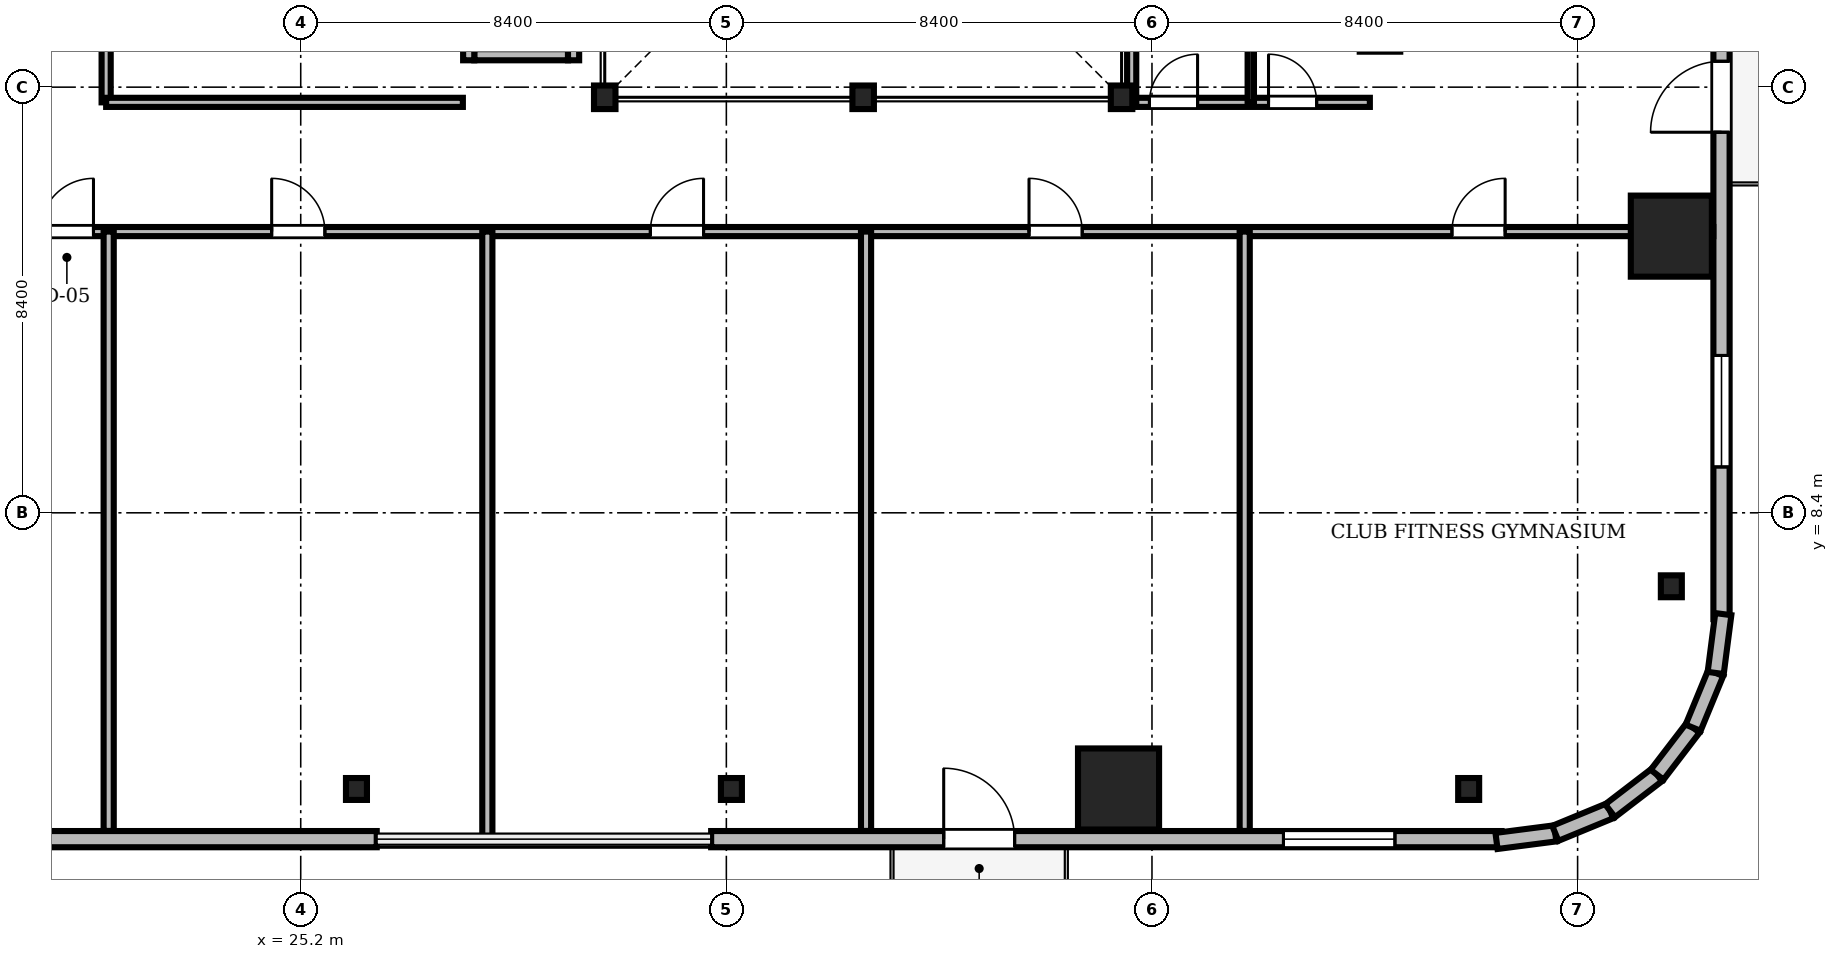
"""IFC4 building model, lengths in metres.
Left out: names, types, materials, properties, quantities, classifications, styles, units other than length and angle.
Written with IfcOpenShell. Run it as: python <this file> out.ifc"""

import sys

from ifc_helpers import new_model, si_unit, direction, frame, frame_2d, origin, origin_2d, place, context, subcontext, project, spatial, rectangle, i_section, extrude, source, transform, mapped, element, fill, save


model = new_model("IFC4")
c1 = context("Model", 3, precision=1e-05, world=origin(), true_north=direction((0.0, 1.0)))
c2 = subcontext(c1, "Body", "Model", "MODEL_VIEW")
j1 = project(units=[si_unit("LENGTHUNIT", "METRE"), si_unit("PLANEANGLEUNIT", "RADIAN")], contexts=[c1])
p1 = place(None, origin())
s1 = spatial("IfcSite", under=j1, at=p1, CompositionType="ELEMENT")
p2 = place(p1, origin())
s2 = spatial("IfcBuilding", under=s1, at=p2, CompositionType="ELEMENT")
p3 = place(p2, frame((0.0, 0.0, 115.0)))
s3 = spatial("IfcBuildingStorey", under=s2, at=p3, CompositionType="ELEMENT", Elevation=115.0)
m1 = source(origin(), c2, "Body", "SweptSolid", [
    extrude(i_section(OverallWidth=0.424, OverallDepth=0.465, WebThickness=0.035, FlangeThickness=0.056, FilletRadius=0.015, at=origin_2d()), origin(), (0.0, 0.0, 1.0), 3.46),
])
for number, where, z_axis, x_axis in (
    (1, (31.2, 16.6, 0.0), (0.0, 0.0, 1.0), (1.0, 0.0, 0.0)),
    (2, (36.3, 16.6, 0.0), (0.0, 0.0, 1.0), (1.0, 0.0, 0.0)),
    (3, (41.4, 16.6, 0.0), (0.0, 0.0, 1.0), (1.0, 0.0, 0.0)),
):
    element("IfcColumn", number, at=place(p3, frame(where, z_axis=z_axis, x_axis=x_axis)), inside=s3, PredefinedType="COLUMN", context=c2, shape_type="MappedRepresentation", body=[
        mapped(m1, transform((0.0, 0.0, 0.0), scale=1.0)),
    ])
m2 = source(origin(), c2, "Body", "SweptSolid", [
    extrude(rectangle(XDim=1.6, YDim=1.6, at=origin_2d()), origin(), (0.0, 0.0, 1.0), 3.46),
])
for number, where, z_axis, x_axis in (
    (4, (41.34, 2.95, 0.0), (0.0, 0.0, 1.0), (1.0, 0.0, 0.0)),
    (5, (52.25, 13.86, 0.0), (0.0, 0.0, 1.0), (1.0, 0.0, 0.0)),
):
    element("IfcColumn", number, at=place(p3, frame(where, z_axis=z_axis, x_axis=x_axis)), inside=s3, PredefinedType="COLUMN", context=c2, shape_type="MappedRepresentation", body=[
        mapped(m2, transform((0.0, 0.0, 0.0), scale=1.0)),
    ])
m3 = source(origin(), c2, "Body", "SweptSolid", [
    extrude(i_section(OverallWidth=0.414, OverallDepth=0.432, WebThickness=0.026, FlangeThickness=0.04, FilletRadius=0.015, at=origin_2d()), origin(), (0.0, 0.0, 1.0), 3.46),
])
for number, where, z_axis, x_axis in (
    (6, (26.3, 2.95, 0.0), (0.0, 0.0, 1.0), (1.0, 0.0, 0.0)),
    (7, (33.7, 2.95, 0.0), (0.0, 0.0, 1.0), (1.0, 0.0, 0.0)),
    (8, (48.25, 2.95, 0.0), (0.0, 0.0, 1.0), (1.0, 0.0, 0.0)),
    (9, (52.25, 6.95, 0.0), (0.0, 0.0, 1.0), (1.0, 0.0, 0.0)),
):
    element("IfcColumn", number, at=place(p3, frame(where, z_axis=z_axis, x_axis=x_axis)), inside=s3, PredefinedType="COLUMN", context=c2, shape_type="MappedRepresentation", body=[
        mapped(m3, transform((0.0, 0.0, 0.0), scale=1.0)),
    ])
m4 = source(origin(), c2, "Body", "SweptSolid", [
    extrude(rectangle(XDim=15.6, YDim=0.32, at=frame_2d((7.8, 0.0))), origin(), (0.0, 0.0, 1.0), 3.46),
])
p4 = place(p3, frame((11.1, 1.96, 0.0), z_axis=(0.0, 0.0, 1.0), x_axis=(1.0, 0.0, 0.0)))
e10 = element("IfcWall", 10, at=p4, inside=s3, PredefinedType="SOLIDWALL", context=c2, shape_type="MappedRepresentation", body=[
    mapped(m4, transform((0.0, 0.0, 0.0), scale=1.0)),
])
m5 = source(origin(), c2, "Body", "SweptSolid", [
    extrude(rectangle(XDim=2.2, YDim=2.4, at=frame_2d((1.1, 1.2))), frame((0.0, 0.17, 0.0), z_axis=(0.0, -1.0, 0.0), x_axis=(1.0, 0.0, 0.0)), (0.0, 0.0, 1.0), 0.34),
])
p5 = place(p4, frame((3.005, 0.0, 0.72)))
e11 = element("IfcOpeningElement", 11, at=p5, cuts=e10, PredefinedType="OPENING", context=c2, shape_type="MappedRepresentation", body=[
    mapped(m5, transform((0.0, 0.0, 0.0), scale=1.0)),
])
p6 = place(p3, frame((33.3, 1.96, 0.0), z_axis=(0.0, 0.0, 1.0), x_axis=(1.0, 0.0, 0.0)))
e12 = element("IfcWall", 12, at=p6, inside=s3, PredefinedType="SOLIDWALL", context=c2, shape_type="MappedRepresentation", body=[
    mapped(m4, transform((0.0, 0.0, 0.0), scale=1.0)),
])
m6 = source(origin(), c2, "Body", "SweptSolid", [
    extrude(rectangle(XDim=1.4, YDim=2.3, at=frame_2d((0.7, 1.15))), frame((0.0, 0.17, 0.0), z_axis=(0.0, -1.0, 0.0), x_axis=(1.0, 0.0, 0.0)), (0.0, 0.0, 1.0), 0.34),
])
p7 = place(p6, frame((4.59, 0.0, 0.0)))
e13 = element("IfcOpeningElement", 13, at=p7, cuts=e12, PredefinedType="OPENING", context=c2, shape_type="MappedRepresentation", body=[
    mapped(m6, transform((0.0, 0.0, 0.0), scale=1.0)),
])
p8 = place(p6, frame((11.295, 0.0, 0.72)))
e14 = element("IfcOpeningElement", 14, at=p8, cuts=e12, PredefinedType="OPENING", context=c2, shape_type="MappedRepresentation", body=[
    mapped(m5, transform((0.0, 0.0, 0.0), scale=1.0)),
])
p9 = place(p3, frame((53.24, 6.3, 0.0), z_axis=(0.0, 0.0, 1.0), x_axis=(0.0, 1.0, 0.0)))
e15 = element("IfcWall", 15, at=p9, inside=s3, PredefinedType="SOLIDWALL", context=c2, shape_type="MappedRepresentation", body=[
    mapped(m4, transform((0.0, 0.0, 0.0), scale=1.0)),
])
p10 = place(p9, frame((9.61, 0.0, 0.0)))
e16 = element("IfcOpeningElement", 16, at=p10, cuts=e15, PredefinedType="OPENING", context=c2, shape_type="MappedRepresentation", body=[
    mapped(m6, transform((0.0, 0.0, 0.0), scale=1.0)),
])
p11 = place(p9, frame((3.005, 0.0, 0.72)))
e17 = element("IfcOpeningElement", 17, at=p11, cuts=e15, PredefinedType="OPENING", context=c2, shape_type="MappedRepresentation", body=[
    mapped(m5, transform((0.0, 0.0, 0.0), scale=1.0)),
])
m7 = source(origin(), c2, "Body", "SweptSolid", [
    extrude(rectangle(XDim=1.17, YDim=0.32, at=frame_2d((0.585, 0.0))), origin(), (0.0, 0.0, 1.0), 3.46),
])
p12 = place(p3, frame((48.8, 1.925, 0.0), z_axis=(0.0, 0.0, 1.0), x_axis=(0.991762485493, 0.128090485085, 0.0)))
e18 = element("IfcWall", 18, at=p12, inside=s3, PredefinedType="SOLIDWALL", context=c2, shape_type="MappedRepresentation", body=[
    mapped(m7, transform((0.0, 0.0, 0.0), scale=1.0)),
])
m8 = source(origin(), c2, "Body", "SweptSolid", [
    extrude(rectangle(XDim=1.169, YDim=0.32, at=frame_2d((0.585, 0.0))), origin(), (0.0, 0.0, 1.0), 3.46),
])
p13 = place(p3, frame((49.96, 2.074, 0.0), z_axis=(0.0, 0.0, 1.0), x_axis=(0.924479075121, 0.381232789334, 0.0)))
e19 = element("IfcWall", 19, at=p13, inside=s3, PredefinedType="SOLIDWALL", context=c2, shape_type="MappedRepresentation", body=[
    mapped(m8, transform((0.0, 0.0, 0.0), scale=1.0)),
])
m9 = source(origin(), c2, "Body", "SweptSolid", [
    extrude(rectangle(XDim=1.169, YDim=0.32, at=frame_2d((0.584, 0.0))), origin(), (0.0, 0.0, 1.0), 3.46),
])
p14 = place(p3, frame((51.041, 2.52, 0.0), z_axis=(0.0, 0.0, 1.0), x_axis=(0.793663520347, 0.608356981114, 0.0)))
e20 = element("IfcWall", 20, at=p14, inside=s3, PredefinedType="SOLIDWALL", context=c2, shape_type="MappedRepresentation", body=[
    mapped(m9, transform((0.0, 0.0, 0.0), scale=1.0)),
])
m10 = source(origin(), c2, "Body", "SweptSolid", [
    extrude(rectangle(XDim=1.169, YDim=0.32, at=frame_2d((0.584, 0.0))), origin(), (0.0, 0.0, 1.0), 3.46),
])
for number, where, z_axis, x_axis in (
    (21, (51.969, 3.231, 0.0), (0.0, 0.0, 1.0), (0.608, 0.794, 0.0)),
    (22, (52.68, 4.159, 0.0), (0.0, 0.0, 1.0), (0.381, 0.925, 0.0)),
):
    element("IfcWall", number, at=place(p3, frame(where, z_axis=z_axis, x_axis=x_axis)), inside=s3, PredefinedType="SOLIDWALL", context=c2, shape_type="MappedRepresentation", body=[
        mapped(m10, transform((0.0, 0.0, 0.0), scale=1.0)),
    ])
m11 = source(origin(), c2, "Body", "SweptSolid", [
    extrude(rectangle(XDim=1.171, YDim=0.32, at=frame_2d((0.585, 0.0))), origin(), (0.0, 0.0, 1.0), 3.46),
])
p15 = place(p3, frame((53.125, 5.24, 0.0), z_axis=(0.0, 0.0, 1.0), x_axis=(0.128269133229, 0.991739395941, 0.0)))
e23 = element("IfcWall", 23, at=p15, inside=s3, PredefinedType="SOLIDWALL", context=c2, shape_type="MappedRepresentation", body=[
    mapped(m11, transform((0.0, 0.0, 0.0), scale=1.0)),
])
m12 = source(origin(), c2, "Body", "SweptSolid", [
    extrude(rectangle(XDim=1.85, YDim=0.22, at=frame_2d((0.925, 0.0))), origin(), (0.0, 0.0, 1.0), 3.46),
])
p16 = place(p3, frame((28.625, 17.44, 0.0), z_axis=(0.0, 0.0, 1.0), x_axis=(1.0, 0.0, 0.0)))
e24 = element("IfcWall", 24, at=p16, inside=s3, PredefinedType="SOLIDWALL", context=c2, shape_type="MappedRepresentation", body=[
    mapped(m12, transform((0.0, 0.0, 0.0), scale=1.0)),
])
m13 = source(origin(), c2, "Body", "SweptSolid", [
    extrude(rectangle(XDim=2.54, YDim=0.22, at=frame_2d((1.27, 0.0))), origin(), (0.0, 0.0, 1.0), 3.46),
])
for number, where, z_axis, x_axis in (
    (25, (28.515, 17.33, 0.0), (0.0, 0.0, 1.0), (0.0, 1.0, 0.0)),
    (26, (30.585, 17.33, 0.0), (0.0, 0.0, 1.0), (0.0, 1.0, 0.0)),
):
    element("IfcWall", number, at=place(p3, frame(where, z_axis=z_axis, x_axis=x_axis)), inside=s3, PredefinedType="SOLIDWALL", context=c2, shape_type="MappedRepresentation", body=[
        mapped(m13, transform((0.0, 0.0, 0.0), scale=1.0)),
    ])
m14 = source(origin(), c2, "Body", "SweptSolid", [
    extrude(rectangle(XDim=46.156, YDim=0.18, at=frame_2d((23.078, 0.0))), origin(), (0.0, 0.0, 1.0), 2.702),
])
p17 = place(p3, frame((6.922, 13.95, 0.0), z_axis=(0.0, 0.0, 1.0), x_axis=(1.0, 0.0, 0.0)))
e27 = element("IfcWall", 27, at=p17, inside=s3, PredefinedType="PARTITIONING", context=c2, shape_type="MappedRepresentation", body=[
    mapped(m14, transform((0.0, 0.0, 0.0), scale=1.0)),
])
m15 = source(origin(), c2, "Body", "SweptSolid", [
    extrude(rectangle(XDim=1.05, YDim=2.2, at=frame_2d((0.525, 1.1))), frame((0.0, 0.1, 0.0), z_axis=(0.0, -1.0, 0.0), x_axis=(1.0, 0.0, 0.0)), (0.0, 0.0, 1.0), 0.2),
])
p18 = place(p17, frame((13.138, 0.0, 0.0)))
e28 = element("IfcOpeningElement", 28, at=p18, cuts=e27, PredefinedType="OPENING", context=c2, shape_type="MappedRepresentation", body=[
    mapped(m15, transform((0.0, 0.0, 0.0), scale=1.0)),
])
p19 = place(p17, frame((17.705, 0.0, 0.0)))
e29 = element("IfcOpeningElement", 29, at=p19, cuts=e27, PredefinedType="OPENING", context=c2, shape_type="MappedRepresentation", body=[
    mapped(m15, transform((0.0, 0.0, 0.0), scale=1.0)),
])
p20 = place(p17, frame((25.178, 0.0, 0.0)))
e30 = element("IfcOpeningElement", 30, at=p20, cuts=e27, PredefinedType="OPENING", context=c2, shape_type="MappedRepresentation", body=[
    mapped(m15, transform((0.0, 0.0, 0.0), scale=1.0)),
])
p21 = place(p17, frame((32.651, 0.0, 0.0)))
e31 = element("IfcOpeningElement", 31, at=p21, cuts=e27, PredefinedType="OPENING", context=c2, shape_type="MappedRepresentation", body=[
    mapped(m15, transform((0.0, 0.0, 0.0), scale=1.0)),
])
p22 = place(p17, frame((40.998, 0.0, 0.0)))
e32 = element("IfcOpeningElement", 32, at=p22, cuts=e27, PredefinedType="OPENING", context=c2, shape_type="MappedRepresentation", body=[
    mapped(m15, transform((0.0, 0.0, 0.0), scale=1.0)),
])
m16 = source(origin(), c2, "Body", "SweptSolid", [
    extrude(rectangle(XDim=4.7, YDim=0.18, at=frame_2d((2.35, 0.0))), origin(), (0.0, 0.0, 1.0), 2.852),
])
p23 = place(p3, frame((41.6, 16.5, 0.0), z_axis=(0.0, 0.0, 1.0), x_axis=(1.0, 0.0, 0.0)))
e33 = element("IfcWall", 33, at=p23, inside=s3, PredefinedType="PARTITIONING", context=c2, shape_type="MappedRepresentation", body=[
    mapped(m16, transform((0.0, 0.0, 0.0), scale=1.0)),
])
m17 = source(origin(), c2, "Body", "SweptSolid", [
    extrude(rectangle(XDim=0.95, YDim=2.15, at=frame_2d((0.475, 1.075))), frame((0.0, 0.1, 0.0), z_axis=(0.0, -1.0, 0.0), x_axis=(1.0, 0.0, 0.0)), (0.0, 0.0, 1.0), 0.2),
])
p24 = place(p23, frame((0.35, 0.0, 0.0)))
e34 = element("IfcOpeningElement", 34, at=p24, cuts=e33, PredefinedType="OPENING", context=c2, shape_type="MappedRepresentation", body=[
    mapped(m17, transform((0.0, 0.0, 0.0), scale=1.0)),
])
p25 = place(p23, frame((2.7, 0.0, 0.0)))
e35 = element("IfcOpeningElement", 35, at=p25, cuts=e33, PredefinedType="OPENING", context=c2, shape_type="MappedRepresentation", body=[
    mapped(m17, transform((0.0, 0.0, 0.0), scale=1.0)),
])
m18 = source(origin(), c2, "Body", "SweptSolid", [
    extrude(rectangle(XDim=3.55, YDim=0.18, at=frame_2d((1.775, 0.0))), origin(), (0.0, 0.0, 1.0), 2.852),
])
p26 = place(p3, frame((21.36, 16.5, 0.0), z_axis=(0.0, 0.0, 1.0), x_axis=(0.0, 1.0, 0.0)))
e36 = element("IfcWall", 36, at=p26, inside=s3, PredefinedType="PARTITIONING", context=c2, shape_type="MappedRepresentation", body=[
    mapped(m18, transform((0.0, 0.0, 0.0), scale=1.0)),
])
p27 = place(p26, frame((1.15, 0.0, 0.0)))
e37 = element("IfcOpeningElement", 37, at=p27, cuts=e36, PredefinedType="OPENING", context=c2, shape_type="MappedRepresentation", body=[
    mapped(m15, transform((0.0, 0.0, 0.0), scale=1.0)),
])
m19 = source(origin(), c2, "Body", "SweptSolid", [
    extrude(rectangle(XDim=11.828, YDim=0.2, at=frame_2d((5.914, 0.0))), origin(), (0.0, 0.0, 1.0), 2.702),
])
p28 = place(p3, frame((21.41, 2.122, 0.0), z_axis=(0.0, 0.0, 1.0), x_axis=(0.0, 1.0, 0.0)))
e38 = element("IfcWall", 38, at=p28, inside=s3, PredefinedType="PARTITIONING", context=c2, shape_type="MappedRepresentation", body=[
    mapped(m19, transform((0.0, 0.0, 0.0), scale=1.0)),
])
m20 = source(origin(), c2, "Body", "SweptSolid", [
    extrude(rectangle(XDim=12.02, YDim=0.2, at=frame_2d((6.01, 0.0))), origin(), (0.0, 0.0, 1.0), 2.702),
])
p29 = place(p3, frame((28.883, 1.93, 0.0), z_axis=(0.0, 0.0, 1.0), x_axis=(0.0, 1.0, 0.0)))
e39 = element("IfcWall", 39, at=p29, inside=s3, PredefinedType="PARTITIONING", context=c2, shape_type="MappedRepresentation", body=[
    mapped(m20, transform((0.0, 0.0, 0.0), scale=1.0)),
])
for number, where, z_axis, x_axis in (
    (40, (36.357, 2.122, 0.0), (0.0, 0.0, 1.0), (0.0, 1.0, 0.0)),
    (41, (43.83, 2.122, 0.0), (0.0, 0.0, 1.0), (0.0, 1.0, 0.0)),
):
    element("IfcWall", number, at=place(p3, frame(where, z_axis=z_axis, x_axis=x_axis)), inside=s3, PredefinedType="PARTITIONING", context=c2, shape_type="MappedRepresentation", body=[
        mapped(m19, transform((0.0, 0.0, 0.0), scale=1.0)),
    ])
m21 = source(origin(), c2, "Body", "SweptSolid", [
    extrude(rectangle(XDim=7.15, YDim=0.18, at=frame_2d((3.575, 0.0))), origin(), (0.0, 0.0, 1.0), 2.852),
])
p30 = place(p3, frame((41.6, 16.5, 0.0), z_axis=(0.0, 0.0, 1.0), x_axis=(0.0, 1.0, 0.0)))
e42 = element("IfcWall", 42, at=p30, inside=s3, PredefinedType="PARTITIONING", context=c2, shape_type="MappedRepresentation", body=[
    mapped(m21, transform((0.0, 0.0, 0.0), scale=1.0)),
])
m22 = source(origin(), c2, "Body", "SweptSolid", [
    extrude(rectangle(XDim=7.15, YDim=0.125, at=frame_2d((3.575, 0.0))), origin(), (0.0, 0.0, 1.0), 2.852),
])
p31 = place(p3, frame((43.95, 16.5, 0.0), z_axis=(0.0, 0.0, 1.0), x_axis=(0.0, 1.0, 0.0)))
e43 = element("IfcWall", 43, at=p31, inside=s3, PredefinedType="PARTITIONING", context=c2, shape_type="MappedRepresentation", body=[
    mapped(m22, transform((0.0, 0.0, 0.0), scale=1.0)),
])
m23 = source(origin(), c2, "Body", "SweptSolid", [
    extrude(rectangle(XDim=7.04, YDim=0.18, at=frame_2d((3.52, 0.0))), origin(), (0.0, 0.0, 1.0), 3.46),
])
p32 = place(p3, frame((21.36, 16.5, 0.0), z_axis=(0.0, 0.0, 1.0), x_axis=(1.0, 0.0, 0.0)))
e44 = element("IfcWall", 44, at=p32, inside=s3, PredefinedType="PARTITIONING", context=c2, shape_type="MappedRepresentation", body=[
    mapped(m23, transform((0.0, 0.0, 0.0), scale=1.0)),
])
m24 = source(origin(), c2, "Body", "SweptSolid", [
    extrude(rectangle(XDim=1.4, YDim=2.3, at=frame_2d((0.7, 1.15))), frame((0.0, 0.025, 0.0), z_axis=(0.0, -1.0, 0.0), x_axis=(1.0, 0.0, 0.0)), (0.0, 0.0, 1.0), 0.05),
])
p33 = place(p7, frame((1.4, 0.0, 0.0), z_axis=(0.0, 0.0, 1.0), x_axis=(-1.0, 0.0, 0.0)))
e45 = element("IfcDoor", 45, at=p33, inside=s3, OperationType="DOUBLE_DOOR_SLIDING", PredefinedType="DOOR", context=c2, shape_type="MappedRepresentation", body=[
    mapped(m24, transform((0.0, 0.0, 0.0), scale=1.0)),
])
fill(e13, e45)
m25 = source(origin(), c2, "Body", "SweptSolid", [
    extrude(rectangle(XDim=2.2, YDim=2.4, at=frame_2d((1.1, 1.2))), frame((0.0, 0.03, 0.0), z_axis=(0.0, -1.0, 0.0), x_axis=(1.0, 0.0, 0.0)), (0.0, 0.0, 1.0), 0.06),
])
p34 = place(p8, origin())
e46 = element("IfcWindow", 46, at=p34, inside=s3, PartitioningType="SINGLE_PANEL", PredefinedType="WINDOW", context=c2, shape_type="MappedRepresentation", body=[
    mapped(m25, transform((0.0, 0.0, 0.0), scale=1.0)),
])
fill(e14, e46)
p35 = place(p10, frame((1.4, 0.0, 0.0), z_axis=(0.0, 0.0, 1.0), x_axis=(-1.0, 0.0, 0.0)))
e47 = element("IfcDoor", 47, at=p35, inside=s3, OperationType="DOUBLE_DOOR_SLIDING", PredefinedType="DOOR", context=c2, shape_type="MappedRepresentation", body=[
    mapped(m24, transform((0.0, 0.0, 0.0), scale=1.0)),
])
fill(e16, e47)
p36 = place(p11, origin())
e48 = element("IfcWindow", 48, at=p36, inside=s3, PartitioningType="SINGLE_PANEL", PredefinedType="WINDOW", context=c2, shape_type="MappedRepresentation", body=[
    mapped(m25, transform((0.0, 0.0, 0.0), scale=1.0)),
])
fill(e17, e48)
m26 = source(origin(), c2, "Body", "SweptSolid", [
    extrude(rectangle(XDim=1.05, YDim=2.2, at=frame_2d((0.525, 1.1))), frame((0.0, 0.025, 0.0), z_axis=(0.0, -1.0, 0.0), x_axis=(1.0, 0.0, 0.0)), (0.0, 0.0, 1.0), 0.05),
])
p37 = place(p18, origin())
e49 = element("IfcDoor", 49, at=p37, inside=s3, OperationType="SINGLE_SWING_RIGHT", PredefinedType="DOOR", context=c2, shape_type="MappedRepresentation", body=[
    mapped(m26, transform((0.0, 0.0, 0.0), scale=1.0)),
])
fill(e28, e49)
p38 = place(p19, origin())
e50 = element("IfcDoor", 50, at=p38, inside=s3, OperationType="SINGLE_SWING_LEFT", PredefinedType="DOOR", context=c2, shape_type="MappedRepresentation", body=[
    mapped(m26, transform((0.0, 0.0, 0.0), scale=1.0)),
])
fill(e29, e50)
p39 = place(p20, origin())
e51 = element("IfcDoor", 51, at=p39, inside=s3, OperationType="SINGLE_SWING_RIGHT", PredefinedType="DOOR", context=c2, shape_type="MappedRepresentation", body=[
    mapped(m26, transform((0.0, 0.0, 0.0), scale=1.0)),
])
fill(e30, e51)
p40 = place(p21, origin())
e52 = element("IfcDoor", 52, at=p40, inside=s3, OperationType="SINGLE_SWING_LEFT", PredefinedType="DOOR", context=c2, shape_type="MappedRepresentation", body=[
    mapped(m26, transform((0.0, 0.0, 0.0), scale=1.0)),
])
fill(e31, e52)
p41 = place(p22, origin())
e53 = element("IfcDoor", 53, at=p41, inside=s3, OperationType="SINGLE_SWING_RIGHT", PredefinedType="DOOR", context=c2, shape_type="MappedRepresentation", body=[
    mapped(m26, transform((0.0, 0.0, 0.0), scale=1.0)),
])
fill(e32, e53)
m27 = source(origin(), c2, "Body", "SweptSolid", [
    extrude(rectangle(XDim=0.95, YDim=2.15, at=frame_2d((0.475, 1.075))), frame((0.0, 0.025, 0.0), z_axis=(0.0, -1.0, 0.0), x_axis=(1.0, 0.0, 0.0)), (0.0, 0.0, 1.0), 0.05),
])
p42 = place(p24, origin())
e54 = element("IfcDoor", 54, at=p42, inside=s3, OperationType="SINGLE_SWING_RIGHT", PredefinedType="DOOR", context=c2, shape_type="MappedRepresentation", body=[
    mapped(m27, transform((0.0, 0.0, 0.0), scale=1.0)),
])
fill(e34, e54)
p43 = place(p25, origin())
e55 = element("IfcDoor", 55, at=p43, inside=s3, OperationType="SINGLE_SWING_LEFT", PredefinedType="DOOR", context=c2, shape_type="MappedRepresentation", body=[
    mapped(m27, transform((0.0, 0.0, 0.0), scale=1.0)),
])
fill(e35, e55)
save(model, sys.argv[1])
